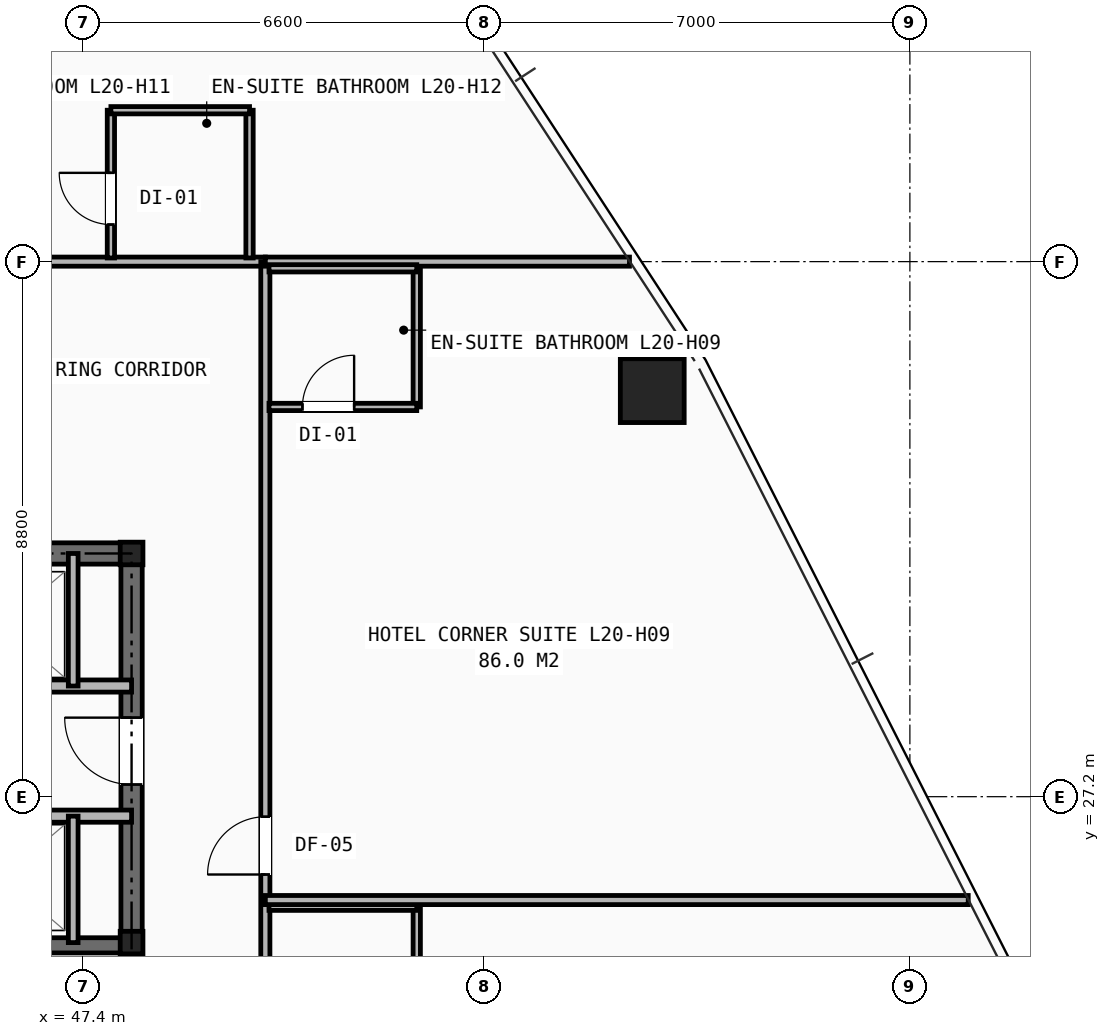
"""IFC4 building model, lengths in metres.
Left out: names, types, materials, properties, quantities, classifications, styles, units other than length and angle.
Written with IfcOpenShell. Run it as: python <this file> out.ifc"""

import sys

from ifc_helpers import new_model, si_unit, direction, frame, frame_2d, origin, origin_2d, place, context, subcontext, project, spatial, rectangle, hollow_rectangle, i_section, extrude, element, fill, save


model = new_model("IFC4")
c1 = context("Model", 3, precision=1e-05, world=origin(), true_north=direction((0.0, 1.0)))
c2 = subcontext(c1, "Body", "Model", "MODEL_VIEW")
j1 = project(units=[si_unit("LENGTHUNIT", "METRE"), si_unit("PLANEANGLEUNIT", "RADIAN")], contexts=[c1])
p1 = place(None, origin())
s1 = spatial("IfcSite", under=j1, at=p1, CompositionType="ELEMENT")
p2 = place(p1, origin())
s2 = spatial("IfcBuilding", under=s1, at=p2, CompositionType="ELEMENT")
p3 = place(p2, frame((0.0, 0.0, 73.4)))
s3 = spatial("IfcBuildingStorey", under=s2, at=p3, CompositionType="ELEMENT", Elevation=73.4)
for number, where, z_axis, x_axis in (
    (1, (48.2, 24.8, 0.0), (0.0, 0.0, 1.0), (1.0, 0.0, 0.0)),
    (2, (48.2, 31.2, 0.0), (0.0, 0.0, 1.0), (1.0, 0.0, 0.0)),
):
    element("IfcColumn", number, at=place(p3, frame(where, z_axis=z_axis, x_axis=x_axis)), inside=s3, PredefinedType="COLUMN", context=c2, shape_type="SweptSolid", body=[
        extrude(i_section(OverallWidth=0.374, OverallDepth=0.372, WebThickness=0.016, FlangeThickness=0.026, at=origin_2d()), origin(), (0.0, 0.0, 1.0), 3.2),
    ])
p4 = place(p3, frame((56.763, 33.878, 0.0), z_axis=(0.0, 0.0, 1.0), x_axis=(1.0, 0.0, 0.0)))
e3 = element("IfcColumn", 3, at=p4, inside=s3, PredefinedType="COLUMN", context=c2, shape_type="SweptSolid", body=[
    extrude(hollow_rectangle(XDim=1.05, YDim=1.05, WallThickness=0.07, at=origin_2d()), origin(), (0.0, 0.0, 1.0), 3.2),
])
p5 = place(p3, frame((31.8, 31.2, 0.0), z_axis=(0.0, 0.0, 1.0), x_axis=(1.0, 0.0, 0.0)))
e4 = element("IfcWall", 4, at=p5, inside=s3, PredefinedType="SHEAR", context=c2, shape_type="SweptSolid", body=[
    extrude(rectangle(XDim=16.4, YDim=0.35, at=frame_2d((8.2, 0.0))), origin(), (0.0, 0.0, 1.0), 2.97),
])
p6 = place(p3, frame((48.2, 16.4, 0.0), z_axis=(0.0, 0.0, 1.0), x_axis=(0.0, 1.0, 0.0)))
e5 = element("IfcWall", 5, at=p6, inside=s3, PredefinedType="SHEAR", context=c2, shape_type="SweptSolid", body=[
    extrude(rectangle(XDim=14.8, YDim=0.35, at=frame_2d((7.4, 0.0))), origin(), (0.0, 0.0, 1.0), 2.97),
])
p7 = place(p6, frame((11.0, 0.0, 0.0)))
e6 = element("IfcOpeningElement", 6, at=p7, cuts=e5, PredefinedType="OPENING", context=c2, shape_type="SweptSolid", body=[
    extrude(rectangle(XDim=1.1, YDim=2.15, at=frame_2d((0.55, 1.075))), frame((0.0, 0.185, 0.0), z_axis=(0.0, -1.0, 0.0), x_axis=(1.0, 0.0, 0.0)), (0.0, 0.0, 1.0), 0.37),
])
p8 = place(p3, frame((44.955, 24.755, 0.0), z_axis=(0.0, 0.0, 1.0), x_axis=(1.0, 0.0, 0.0)))
e7 = element("IfcWall", 7, at=p8, inside=s3, PredefinedType="SHEAR", context=c2, shape_type="SweptSolid", body=[
    extrude(rectangle(XDim=3.245, YDim=0.25, at=frame_2d((1.623, 0.0))), origin(), (0.0, 0.0, 1.0), 2.97),
])
p9 = place(p3, frame((33.82, 29.02, 0.0), z_axis=(0.0, 0.0, 1.0), x_axis=(1.0, 0.0, 0.0)))
e8 = element("IfcWall", 8, at=p9, inside=s3, PredefinedType="SOLIDWALL", context=c2, shape_type="SweptSolid", body=[
    extrude(rectangle(XDim=14.38, YDim=0.2, at=frame_2d((7.19, 0.0))), origin(), (0.0, 0.0, 1.0), 2.421),
])
p10 = place(p9, frame((0.53, 0.0, 0.0)))
e9 = element("IfcOpeningElement", 9, at=p10, cuts=e8, PredefinedType="OPENING", context=c2, shape_type="SweptSolid", body=[
    extrude(rectangle(XDim=1.1, YDim=2.15, at=frame_2d((0.55, 1.075))), frame((0.0, 0.11, 0.0), z_axis=(0.0, -1.0, 0.0), x_axis=(1.0, 0.0, 0.0)), (0.0, 0.0, 1.0), 0.22),
])
p11 = place(p9, frame((2.69, 0.0, 0.0)))
e10 = element("IfcOpeningElement", 10, at=p11, cuts=e8, PredefinedType="OPENING", context=c2, shape_type="SweptSolid", body=[
    extrude(rectangle(XDim=1.1, YDim=2.15, at=frame_2d((0.55, 1.075))), frame((0.0, 0.11, 0.0), z_axis=(0.0, -1.0, 0.0), x_axis=(1.0, 0.0, 0.0)), (0.0, 0.0, 1.0), 0.22),
])
p12 = place(p9, frame((4.85, 0.0, 0.0)))
e11 = element("IfcOpeningElement", 11, at=p12, cuts=e8, PredefinedType="OPENING", context=c2, shape_type="SweptSolid", body=[
    extrude(rectangle(XDim=1.1, YDim=2.15, at=frame_2d((0.55, 1.075))), frame((0.0, 0.11, 0.0), z_axis=(0.0, -1.0, 0.0), x_axis=(1.0, 0.0, 0.0)), (0.0, 0.0, 1.0), 0.22),
])
p13 = place(p9, frame((7.01, 0.0, 0.0)))
e12 = element("IfcOpeningElement", 12, at=p13, cuts=e8, PredefinedType="OPENING", context=c2, shape_type="SweptSolid", body=[
    extrude(rectangle(XDim=1.1, YDim=2.15, at=frame_2d((0.55, 1.075))), frame((0.0, 0.11, 0.0), z_axis=(0.0, -1.0, 0.0), x_axis=(1.0, 0.0, 0.0)), (0.0, 0.0, 1.0), 0.22),
])
p14 = place(p3, frame((31.8, 26.88, 0.0), z_axis=(0.0, 0.0, 1.0), x_axis=(1.0, 0.0, 0.0)))
e13 = element("IfcWall", 13, at=p14, inside=s3, PredefinedType="SOLIDWALL", context=c2, shape_type="SweptSolid", body=[
    extrude(rectangle(XDim=16.4, YDim=0.2, at=frame_2d((8.2, 0.0))), origin(), (0.0, 0.0, 1.0), 2.421),
])
p15 = place(p14, frame((0.55, 0.0, 0.0)))
e14 = element("IfcOpeningElement", 14, at=p15, cuts=e13, PredefinedType="OPENING", context=c2, shape_type="SweptSolid", body=[
    extrude(rectangle(XDim=0.85, YDim=2.05, at=frame_2d((0.425, 1.025))), frame((0.0, 0.11, 0.0), z_axis=(0.0, -1.0, 0.0), x_axis=(1.0, 0.0, 0.0)), (0.0, 0.0, 1.0), 0.22),
])
p16 = place(p3, frame((47.24, 29.02, 0.0), z_axis=(0.0, 0.0, 1.0), x_axis=(0.0, 1.0, 0.0)))
e15 = element("IfcWall", 15, at=p16, inside=s3, PredefinedType="SOLIDWALL", context=c2, shape_type="SweptSolid", body=[
    extrude(rectangle(XDim=2.18, YDim=0.16, at=frame_2d((1.09, 0.0))), origin(), (0.0, 0.0, 1.0), 2.698),
])
p17 = place(p3, frame((47.24, 24.8, 0.0), z_axis=(0.0, 0.0, 1.0), x_axis=(0.0, 1.0, 0.0)))
e16 = element("IfcWall", 16, at=p17, inside=s3, PredefinedType="SOLIDWALL", context=c2, shape_type="SweptSolid", body=[
    extrude(rectangle(XDim=2.08, YDim=0.16, at=frame_2d((1.04, 0.0))), origin(), (0.0, 0.0, 1.0), 2.97),
])
p18 = place(p3, frame((40.75, 36.0, 0.0), z_axis=(0.0, 0.0, 1.0), x_axis=(1.0, 0.0, 0.0)))
e17 = element("IfcWall", 17, at=p18, inside=s3, PredefinedType="PARTITIONING", context=c2, shape_type="SweptSolid", body=[
    extrude(rectangle(XDim=9.65, YDim=0.15, at=frame_2d((4.825, 0.0))), origin(), (0.0, 0.0, 1.0), 2.503),
])
p19 = place(p18, frame((3.47, 0.0, 0.0)))
e18 = element("IfcOpeningElement", 18, at=p19, cuts=e17, PredefinedType="OPENING", context=c2, shape_type="SweptSolid", body=[
    extrude(rectangle(XDim=0.95, YDim=2.1, at=frame_2d((0.475, 1.05))), frame((0.0, 0.085, 0.0), z_axis=(0.0, -1.0, 0.0), x_axis=(1.0, 0.0, 0.0)), (0.0, 0.0, 1.0), 0.17),
])
p20 = place(p3, frame((50.4, 14.1, 0.0), z_axis=(0.0, 0.0, 1.0), x_axis=(0.0, 1.0, 0.0)))
e19 = element("IfcWall", 19, at=p20, inside=s3, PredefinedType="PARTITIONING", context=c2, shape_type="SweptSolid", body=[
    extrude(rectangle(XDim=21.9, YDim=0.15, at=frame_2d((10.95, 0.0))), origin(), (0.0, 0.0, 1.0), 2.421),
])
p21 = place(p20, frame((0.42, 0.0, 0.0)))
e20 = element("IfcOpeningElement", 20, at=p21, cuts=e19, PredefinedType="OPENING", context=c2, shape_type="SweptSolid", body=[
    extrude(rectangle(XDim=0.95, YDim=2.1, at=frame_2d((0.475, 1.05))), frame((0.0, 0.085, 0.0), z_axis=(0.0, -1.0, 0.0), x_axis=(1.0, 0.0, 0.0)), (0.0, 0.0, 1.0), 0.17),
])
p22 = place(p20, frame((11.82, 0.0, 0.0)))
e21 = element("IfcOpeningElement", 21, at=p22, cuts=e19, PredefinedType="OPENING", context=c2, shape_type="SweptSolid", body=[
    extrude(rectangle(XDim=0.95, YDim=2.1, at=frame_2d((0.475, 1.05))), frame((0.0, 0.085, 0.0), z_axis=(0.0, -1.0, 0.0), x_axis=(1.0, 0.0, 0.0)), (0.0, 0.0, 1.0), 0.17),
])
p23 = place(p3, frame((50.4, 36.0, 0.0), z_axis=(0.0, 0.0, 1.0), x_axis=(1.0, 0.0, 0.0)))
e22 = element("IfcWall", 22, at=p23, inside=s3, PredefinedType="PARTITIONING", context=c2, shape_type="SweptSolid", body=[
    extrude(rectangle(XDim=5.989, YDim=0.15, at=frame_2d((2.994, 0.0))), origin(), (0.0, 0.0, 1.0), 2.258),
])
p24 = place(p3, frame((52.89, 23.11, 0.0), z_axis=(0.0, 0.0, 1.0), x_axis=(0.0, 1.0, 0.0)))
e23 = element("IfcWall", 23, at=p24, inside=s3, PredefinedType="PARTITIONING", context=c2, shape_type="SweptSolid", body=[
    extrude(rectangle(XDim=2.28, YDim=0.12, at=frame_2d((1.14, 0.0))), origin(), (0.0, 0.0, 1.0), 2.97),
])
p25 = place(p3, frame((50.46, 25.39, 0.0), z_axis=(0.0, 0.0, 1.0), x_axis=(1.0, 0.0, 0.0)))
e24 = element("IfcWall", 24, at=p25, inside=s3, PredefinedType="PARTITIONING", context=c2, shape_type="SweptSolid", body=[
    extrude(rectangle(XDim=2.43, YDim=0.12, at=frame_2d((1.215, 0.0))), origin(), (0.0, 0.0, 1.0), 2.97),
])
p26 = place(p3, frame((50.4, 25.5, 0.0), z_axis=(0.0, 0.0, 1.0), x_axis=(1.0, 0.0, 0.0)))
e25 = element("IfcWall", 25, at=p26, inside=s3, PredefinedType="PARTITIONING", context=c2, shape_type="SweptSolid", body=[
    extrude(rectangle(XDim=11.56, YDim=0.15, at=frame_2d((5.78, 0.0))), origin(), (0.0, 0.0, 1.0), 2.258),
])
p27 = place(p3, frame((52.89, 33.61, 0.0), z_axis=(0.0, 0.0, 1.0), x_axis=(0.0, 1.0, 0.0)))
e26 = element("IfcWall", 26, at=p27, inside=s3, PredefinedType="PARTITIONING", context=c2, shape_type="SweptSolid", body=[
    extrude(rectangle(XDim=2.28, YDim=0.12, at=frame_2d((1.14, 0.0))), origin(), (0.0, 0.0, 1.0), 2.97),
])
p28 = place(p3, frame((50.46, 33.61, 0.0), z_axis=(0.0, 0.0, 1.0), x_axis=(1.0, 0.0, 0.0)))
e27 = element("IfcWall", 27, at=p28, inside=s3, PredefinedType="PARTITIONING", context=c2, shape_type="SweptSolid", body=[
    extrude(rectangle(XDim=2.43, YDim=0.12, at=frame_2d((1.215, 0.0))), origin(), (0.0, 0.0, 1.0), 2.503),
])
p29 = place(p28, frame((0.55, 0.0, 0.0)))
e28 = element("IfcOpeningElement", 28, at=p29, cuts=e27, PredefinedType="OPENING", context=c2, shape_type="SweptSolid", body=[
    extrude(rectangle(XDim=0.85, YDim=2.05, at=frame_2d((0.425, 1.025))), frame((0.0, 0.07, 0.0), z_axis=(0.0, -1.0, 0.0), x_axis=(1.0, 0.0, 0.0)), (0.0, 0.0, 1.0), 0.14),
])
p30 = place(p3, frame((50.46, 35.89, 0.0), z_axis=(0.0, 0.0, 1.0), x_axis=(1.0, 0.0, 0.0)))
e29 = element("IfcWall", 29, at=p30, inside=s3, PredefinedType="PARTITIONING", context=c2, shape_type="SweptSolid", body=[
    extrude(rectangle(XDim=2.43, YDim=0.12, at=frame_2d((1.215, 0.0))), origin(), (0.0, 0.0, 1.0), 2.97),
])
p31 = place(p3, frame((47.86, 36.06, 0.0), z_axis=(0.0, 0.0, 1.0), x_axis=(0.0, 1.0, 0.0)))
e30 = element("IfcWall", 30, at=p31, inside=s3, PredefinedType="PARTITIONING", context=c2, shape_type="SweptSolid", body=[
    extrude(rectangle(XDim=2.43, YDim=0.12, at=frame_2d((1.215, 0.0))), origin(), (0.0, 0.0, 1.0), 2.503),
])
p32 = place(p31, frame((0.55, 0.0, 0.0)))
e31 = element("IfcOpeningElement", 31, at=p32, cuts=e30, PredefinedType="OPENING", context=c2, shape_type="SweptSolid", body=[
    extrude(rectangle(XDim=0.85, YDim=2.05, at=frame_2d((0.425, 1.025))), frame((0.0, 0.07, 0.0), z_axis=(0.0, -1.0, 0.0), x_axis=(1.0, 0.0, 0.0)), (0.0, 0.0, 1.0), 0.14),
])
p33 = place(p3, frame((50.14, 36.06, 0.0), z_axis=(0.0, 0.0, 1.0), x_axis=(0.0, 1.0, 0.0)))
e32 = element("IfcWall", 32, at=p33, inside=s3, PredefinedType="PARTITIONING", context=c2, shape_type="SweptSolid", body=[
    extrude(rectangle(XDim=2.43, YDim=0.12, at=frame_2d((1.215, 0.0))), origin(), (0.0, 0.0, 1.0), 2.503),
])
p34 = place(p3, frame((47.86, 38.49, 0.0), z_axis=(0.0, 0.0, 1.0), x_axis=(1.0, 0.0, 0.0)))
e33 = element("IfcWall", 33, at=p34, inside=s3, PredefinedType="PARTITIONING", context=c2, shape_type="SweptSolid", body=[
    extrude(rectangle(XDim=2.28, YDim=0.12, at=frame_2d((1.14, 0.0))), origin(), (0.0, 0.0, 1.0), 2.503),
])
p35 = place(p7, origin())
e34 = element("IfcDoor", 34, at=p35, inside=s3, OperationType="SINGLE_SWING_RIGHT", PredefinedType="DOOR", context=c2, shape_type="SweptSolid", body=[
    extrude(rectangle(XDim=1.1, YDim=2.15, at=frame_2d((0.55, 1.075))), frame((0.0, 0.025, 0.0), z_axis=(0.0, -1.0, 0.0), x_axis=(1.0, 0.0, 0.0)), (0.0, 0.0, 1.0), 0.05),
])
fill(e6, e34)
p36 = place(p22, origin())
e35 = element("IfcDoor", 35, at=p36, inside=s3, OperationType="SINGLE_SWING_LEFT", PredefinedType="DOOR", context=c2, shape_type="SweptSolid", body=[
    extrude(rectangle(XDim=0.95, YDim=2.1, at=frame_2d((0.475, 1.05))), frame((0.0, 0.025, 0.0), z_axis=(0.0, -1.0, 0.0), x_axis=(1.0, 0.0, 0.0)), (0.0, 0.0, 1.0), 0.05),
])
fill(e21, e35)
p37 = place(p29, origin())
e36 = element("IfcDoor", 36, at=p37, inside=s3, OperationType="SINGLE_SWING_RIGHT", PredefinedType="DOOR", context=c2, shape_type="SweptSolid", body=[
    extrude(rectangle(XDim=0.85, YDim=2.05, at=frame_2d((0.425, 1.025))), frame((0.0, 0.025, 0.0), z_axis=(0.0, -1.0, 0.0), x_axis=(1.0, 0.0, 0.0)), (0.0, 0.0, 1.0), 0.05),
])
fill(e28, e36)
p38 = place(p32, origin())
e37 = element("IfcDoor", 37, at=p38, inside=s3, OperationType="SINGLE_SWING_RIGHT", PredefinedType="DOOR", context=c2, shape_type="SweptSolid", body=[
    extrude(rectangle(XDim=0.85, YDim=2.05, at=frame_2d((0.425, 1.025))), frame((0.0, 0.025, 0.0), z_axis=(0.0, -1.0, 0.0), x_axis=(1.0, 0.0, 0.0)), (0.0, 0.0, 1.0), 0.05),
])
fill(e31, e37)
save(model, sys.argv[1])
